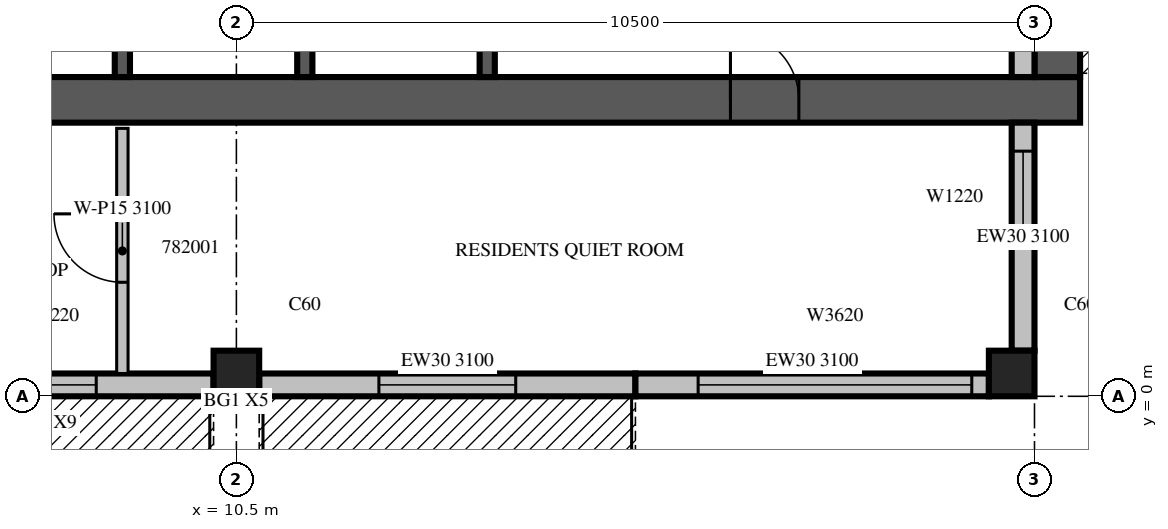
"""IFC4 building model, lengths in metres.
Left out: names, types, materials, properties, quantities, classifications, styles, units other than length and angle.
Written with IfcOpenShell. Run it as: python <this file> out.ifc"""

import sys

from ifc_helpers import new_model, si_unit, direction, frame, frame_2d, origin, origin_2d, place, context, subcontext, project, spatial, rectangle, extrude, source, transform, mapped, element, fill, save


model = new_model("IFC4")
c1 = context("Model", 3, precision=1e-05, world=origin(), true_north=direction((0.0, 1.0)))
c2 = subcontext(c1, "Body", "Model", "MODEL_VIEW")
j1 = project(units=[si_unit("LENGTHUNIT", "METRE"), si_unit("PLANEANGLEUNIT", "RADIAN")], contexts=[c1])
p1 = place(None, origin())
s1 = spatial("IfcSite", under=j1, at=p1, CompositionType="ELEMENT")
p2 = place(p1, origin())
s2 = spatial("IfcBuilding", under=s1, at=p2, CompositionType="ELEMENT")
p3 = place(p2, frame((0.0, 0.0, 347.5)))
s3 = spatial("IfcBuildingStorey", under=s2, at=p3, CompositionType="ELEMENT", Elevation=347.5)
m1 = source(origin(), c2, "Body", "SweptSolid", [
    extrude(rectangle(XDim=0.6, YDim=0.6, at=origin_2d()), origin(), (0.0, 0.0, 1.0), 3.5),
])
for number, where, z_axis, x_axis in (
    (1, (10.5, 0.3, 0.0), (0.0, 0.0, 1.0), (1.0, 0.0, 0.0)),
    (2, (20.7, 0.3, 0.0), (0.0, 0.0, 1.0), (1.0, 0.0, 0.0)),
):
    element("IfcColumn", number, at=place(p3, frame(where, z_axis=z_axis, x_axis=x_axis)), inside=s3, PredefinedType="COLUMN", context=c2, shape_type="MappedRepresentation", body=[
        mapped(m1, transform((0.0, 0.0, 0.0), scale=1.0)),
    ])
m2 = source(origin(), c2, "Body", "SweptSolid", [
    extrude(rectangle(XDim=17.4, YDim=0.6, at=frame_2d((8.7, 0.0))), origin(), (0.0, 0.0, 1.0), 3.5),
])
p4 = place(p3, frame((4.2, 3.9, 0.0), z_axis=(0.0, 0.0, 1.0), x_axis=(1.0, 0.0, 0.0)))
e3 = element("IfcWall", 3, at=p4, inside=s3, PredefinedType="SHEAR", context=c2, shape_type="MappedRepresentation", body=[
    mapped(m2, transform((0.0, 0.0, 0.0), scale=1.0)),
])
m3 = source(origin(), c2, "Body", "SweptSolid", [
    extrude(rectangle(XDim=0.9, YDim=2.1, at=frame_2d((0.45, 1.05))), frame((0.0, 0.31, 0.0), z_axis=(0.0, -1.0, 0.0), x_axis=(1.0, 0.0, 0.0)), (0.0, 0.0, 1.0), 0.62),
])
p5 = place(p4, frame((12.8, 0.0, 0.0)))
e4 = element("IfcOpeningElement", 4, at=p5, cuts=e3, PredefinedType="OPENING", context=c2, shape_type="MappedRepresentation", body=[
    mapped(m3, transform((0.0, 0.0, 0.0), scale=1.0)),
])
m4 = source(origin(), c2, "Body", "SweptSolid", [
    extrude(rectangle(XDim=16.8, YDim=0.6, at=frame_2d((8.4, 0.0))), origin(), (0.0, 0.0, 1.0), 3.5),
])
p6 = place(p3, frame((21.3, 4.2, 0.0), z_axis=(0.0, 0.0, 1.0), x_axis=(0.0, 1.0, 0.0)))
e5 = element("IfcWall", 5, at=p6, inside=s3, PredefinedType="SHEAR", context=c2, shape_type="MappedRepresentation", body=[
    mapped(m4, transform((0.0, 0.0, 0.0), scale=1.0)),
])
m5 = source(origin(), c2, "Body", "SweptSolid", [
    extrude(rectangle(XDim=1.2, YDim=2.1, at=frame_2d((0.6, 1.05))), frame((0.0, 0.31, 0.0), z_axis=(0.0, -1.0, 0.0), x_axis=(1.0, 0.0, 0.0)), (0.0, 0.0, 1.0), 0.62),
])
p7 = place(p6, frame((4.2, 0.0, 0.0)))
e6 = element("IfcOpeningElement", 6, at=p7, cuts=e5, PredefinedType="OPENING", context=c2, shape_type="MappedRepresentation", body=[
    mapped(m5, transform((0.0, 0.0, 0.0), scale=1.0)),
])
m6 = source(origin(), c2, "Body", "SweptSolid", [
    extrude(rectangle(XDim=1.2, YDim=2.4, at=frame_2d((0.6, 1.2))), frame((0.0, 0.31, 0.0), z_axis=(0.0, -1.0, 0.0), x_axis=(1.0, 0.0, 0.0)), (0.0, 0.0, 1.0), 0.62),
])
p8 = place(p6, frame((12.0, 0.0, 0.6)))
e7 = element("IfcOpeningElement", 7, at=p8, cuts=e5, PredefinedType="OPENING", context=c2, shape_type="MappedRepresentation", body=[
    mapped(m6, transform((0.0, 0.0, 0.0), scale=1.0)),
])
m7 = source(origin(), c2, "Body", "SweptSolid", [
    extrude(rectangle(XDim=6.0, YDim=0.3, at=frame_2d((3.0, 0.0))), origin(), (0.0, 0.0, 1.0), 3.1),
])
p9 = place(p3, frame((4.2, 0.15, 0.0), z_axis=(0.0, 0.0, 1.0), x_axis=(1.0, 0.0, 0.0)))
e8 = element("IfcWall", 8, at=p9, inside=s3, PredefinedType="STANDARD", context=c2, shape_type="MappedRepresentation", body=[
    mapped(m7, transform((0.0, 0.0, 0.0), scale=1.0)),
])
m8 = source(origin(), c2, "Body", "SweptSolid", [
    extrude(rectangle(XDim=1.8, YDim=2.4, at=frame_2d((0.9, 1.2))), frame((0.0, 0.16, 0.0), z_axis=(0.0, -1.0, 0.0), x_axis=(1.0, 0.0, 0.0)), (0.0, 0.0, 1.0), 0.32),
])
p10 = place(p9, frame((0.675, 0.0, 0.0)))
e9 = element("IfcOpeningElement", 9, at=p10, cuts=e8, PredefinedType="OPENING", context=c2, shape_type="MappedRepresentation", body=[
    mapped(m8, transform((0.0, 0.0, 0.0), scale=1.0)),
])
m9 = source(origin(), c2, "Body", "SweptSolid", [
    extrude(rectangle(XDim=1.2, YDim=2.0, at=frame_2d((0.6, 1.0))), frame((0.0, 0.16, 0.0), z_axis=(0.0, -1.0, 0.0), x_axis=(1.0, 0.0, 0.0)), (0.0, 0.0, 1.0), 0.32),
])
p11 = place(p9, frame((3.256, 0.0, 0.6)))
e10 = element("IfcOpeningElement", 10, at=p11, cuts=e8, PredefinedType="OPENING", context=c2, shape_type="MappedRepresentation", body=[
    mapped(m9, transform((0.0, 0.0, 0.0), scale=1.0)),
])
p12 = place(p3, frame((10.8, 0.15, 0.0), z_axis=(0.0, 0.0, 1.0), x_axis=(1.0, 0.0, 0.0)))
e11 = element("IfcWall", 11, at=p12, inside=s3, PredefinedType="STANDARD", context=c2, shape_type="SweptSolid", body=[
    extrude(rectangle(XDim=4.95, YDim=0.3, at=frame_2d((2.475, 0.0))), origin(), (0.0, 0.0, 1.0), 3.1),
])
p13 = place(p12, frame((1.575, 0.0, 0.0)))
e12 = element("IfcOpeningElement", 12, at=p13, cuts=e11, PredefinedType="OPENING", context=c2, shape_type="MappedRepresentation", body=[
    mapped(m8, transform((0.0, 0.0, 0.0), scale=1.0)),
])
p14 = place(p3, frame((15.75, 0.15, 0.0), z_axis=(0.0, 0.0, 1.0), x_axis=(1.0, 0.0, 0.0)))
e13 = element("IfcWall", 13, at=p14, inside=s3, PredefinedType="STANDARD", context=c2, shape_type="SweptSolid", body=[
    extrude(rectangle(XDim=4.65, YDim=0.3, at=frame_2d((2.325, 0.0))), origin(), (0.0, 0.0, 1.0), 3.1),
])
m10 = source(origin(), c2, "Body", "SweptSolid", [
    extrude(rectangle(XDim=3.6, YDim=2.0, at=frame_2d((1.8, 1.0))), frame((0.0, 0.16, 0.0), z_axis=(0.0, -1.0, 0.0), x_axis=(1.0, 0.0, 0.0)), (0.0, 0.0, 1.0), 0.32),
])
p15 = place(p14, frame((0.825, 0.0, 0.6)))
e14 = element("IfcOpeningElement", 14, at=p15, cuts=e13, PredefinedType="OPENING", context=c2, shape_type="MappedRepresentation", body=[
    mapped(m10, transform((0.0, 0.0, 0.0), scale=1.0)),
])
m11 = source(origin(), c2, "Body", "SweptSolid", [
    extrude(rectangle(XDim=3.0, YDim=0.3, at=frame_2d((1.5, 0.0))), origin(), (0.0, 0.0, 1.0), 3.1),
])
p16 = place(p3, frame((20.85, 0.6, 0.0), z_axis=(0.0, 0.0, 1.0), x_axis=(0.0, 1.0, 0.0)))
e15 = element("IfcWall", 15, at=p16, inside=s3, PredefinedType="STANDARD", context=c2, shape_type="MappedRepresentation", body=[
    mapped(m11, transform((0.0, 0.0, 0.0), scale=1.0)),
])
p17 = place(p16, frame((1.425, 0.0, 0.6)))
e16 = element("IfcOpeningElement", 16, at=p17, cuts=e15, PredefinedType="OPENING", context=c2, shape_type="MappedRepresentation", body=[
    mapped(m9, transform((0.0, 0.0, 0.0), scale=1.0)),
])
m12 = source(origin(), c2, "Body", "SweptSolid", [
    extrude(rectangle(XDim=1.05, YDim=0.3, at=frame_2d((0.525, 0.0))), origin(), (0.0, 0.0, 1.0), 3.1),
])
p18 = place(p3, frame((20.85, 4.2, 0.0), z_axis=(0.0, 0.0, 1.0), x_axis=(0.0, 1.0, 0.0)))
e17 = element("IfcWall", 17, at=p18, inside=s3, PredefinedType="STANDARD", context=c2, shape_type="MappedRepresentation", body=[
    mapped(m12, transform((0.0, 0.0, 0.0), scale=1.0)),
])
m13 = source(origin(), c2, "Body", "SweptSolid", [
    extrude(rectangle(XDim=3.1, YDim=0.2, at=frame_2d((1.55, 0.0))), origin(), (0.0, 0.0, 1.0), 3.5),
])
for number, where, z_axis, x_axis in (
    (18, (9.0, 4.2, 0.0), (0.0, 0.0, 1.0), (0.0, 1.0, 0.0)),
    (19, (11.4, 4.2, 0.0), (0.0, 0.0, 1.0), (0.0, 1.0, 0.0)),
):
    element("IfcWall", number, at=place(p3, frame(where, z_axis=z_axis, x_axis=x_axis)), inside=s3, PredefinedType="SOLIDWALL", context=c2, shape_type="MappedRepresentation", body=[
        mapped(m13, transform((0.0, 0.0, 0.0), scale=1.0)),
    ])
m14 = source(origin(), c2, "Body", "SweptSolid", [
    extrude(rectangle(XDim=3.1, YDim=0.2, at=frame_2d((1.55, 0.0))), origin(), (0.0, 0.0, 1.0), 3.1),
])
p19 = place(p3, frame((13.8, 4.2, 0.0), z_axis=(0.0, 0.0, 1.0), x_axis=(0.0, 1.0, 0.0)))
e20 = element("IfcWall", 20, at=p19, inside=s3, PredefinedType="SOLIDWALL", context=c2, shape_type="MappedRepresentation", body=[
    mapped(m14, transform((0.0, 0.0, 0.0), scale=1.0)),
])
m15 = source(origin(), c2, "Body", "SweptSolid", [
    extrude(rectangle(XDim=3.225, YDim=0.15, at=frame_2d((1.613, 0.0))), origin(), (0.0, 0.0, 1.0), 3.1),
])
p20 = place(p3, frame((9.0, 3.525, 0.0), z_axis=(0.0, 0.0, 1.0), x_axis=(0.0, -1.0, 0.0)))
e21 = element("IfcWall", 21, at=p20, inside=s3, PredefinedType="PARTITIONING", context=c2, shape_type="MappedRepresentation", body=[
    mapped(m15, transform((0.0, 0.0, 0.0), scale=1.0)),
])
m16 = source(origin(), c2, "Body", "SweptSolid", [
    extrude(rectangle(XDim=0.9, YDim=2.1, at=frame_2d((0.45, 1.05))), frame((0.0, 0.085, 0.0), z_axis=(0.0, -1.0, 0.0), x_axis=(1.0, 0.0, 0.0)), (0.0, 0.0, 1.0), 0.17),
])
p21 = place(p20, frame((1.125, 0.0, 0.0)))
e22 = element("IfcOpeningElement", 22, at=p21, cuts=e21, PredefinedType="OPENING", context=c2, shape_type="MappedRepresentation", body=[
    mapped(m16, transform((0.0, 0.0, 0.0), scale=1.0)),
])
m17 = source(origin(), c2, "Body", "SweptSolid", [
    extrude(rectangle(XDim=1.2, YDim=2.0, at=frame_2d((0.6, 1.0))), frame((0.0, 0.03, 0.0), z_axis=(0.0, -1.0, 0.0), x_axis=(1.0, 0.0, 0.0)), (0.0, 0.0, 1.0), 0.06),
])
p22 = place(p11, origin())
e23 = element("IfcWindow", 23, at=p22, inside=s3, PartitioningType="SINGLE_PANEL", PredefinedType="WINDOW", context=c2, shape_type="MappedRepresentation", body=[
    mapped(m17, transform((0.0, 0.0, 0.0), scale=1.0)),
])
fill(e10, e23)
m18 = source(origin(), c2, "Body", "SweptSolid", [
    extrude(rectangle(XDim=1.8, YDim=2.4, at=frame_2d((0.9, 1.2))), frame((0.0, 0.025, 0.0), z_axis=(0.0, -1.0, 0.0), x_axis=(1.0, 0.0, 0.0)), (0.0, 0.0, 1.0), 0.05),
])
p23 = place(p13, origin())
e24 = element("IfcDoor", 24, at=p23, inside=s3, OperationType="SLIDING_TO_LEFT", PredefinedType="DOOR", context=c2, shape_type="MappedRepresentation", body=[
    mapped(m18, transform((0.0, 0.0, 0.0), scale=1.0)),
])
fill(e12, e24)
m19 = source(origin(), c2, "Body", "SweptSolid", [
    extrude(rectangle(XDim=3.6, YDim=2.0, at=frame_2d((1.8, 1.0))), frame((0.0, 0.03, 0.0), z_axis=(0.0, -1.0, 0.0), x_axis=(1.0, 0.0, 0.0)), (0.0, 0.0, 1.0), 0.06),
])
p24 = place(p15, origin())
e25 = element("IfcWindow", 25, at=p24, inside=s3, PartitioningType="SINGLE_PANEL", PredefinedType="WINDOW", context=c2, shape_type="MappedRepresentation", body=[
    mapped(m19, transform((0.0, 0.0, 0.0), scale=1.0)),
])
fill(e14, e25)
p25 = place(p17, origin())
e26 = element("IfcWindow", 26, at=p25, inside=s3, PartitioningType="SINGLE_PANEL", PredefinedType="WINDOW", context=c2, shape_type="MappedRepresentation", body=[
    mapped(m17, transform((0.0, 0.0, 0.0), scale=1.0)),
])
fill(e16, e26)
m20 = source(origin(), c2, "Body", "SweptSolid", [
    extrude(rectangle(XDim=0.9, YDim=2.1, at=frame_2d((0.45, 1.05))), frame((0.0, 0.025, 0.0), z_axis=(0.0, -1.0, 0.0), x_axis=(1.0, 0.0, 0.0)), (0.0, 0.0, 1.0), 0.05),
])
p26 = place(p5, origin())
e27 = element("IfcDoor", 27, at=p26, inside=s3, OperationType="SINGLE_SWING_LEFT", PredefinedType="DOOR", context=c2, shape_type="MappedRepresentation", body=[
    mapped(m20, transform((0.0, 0.0, 0.0), scale=1.0)),
])
fill(e4, e27)
p27 = place(p21, origin())
e28 = element("IfcDoor", 28, at=p27, inside=s3, OperationType="SINGLE_SWING_RIGHT", PredefinedType="DOOR", context=c2, shape_type="MappedRepresentation", body=[
    mapped(m20, transform((0.0, 0.0, 0.0), scale=1.0)),
])
fill(e22, e28)
save(model, sys.argv[1])
